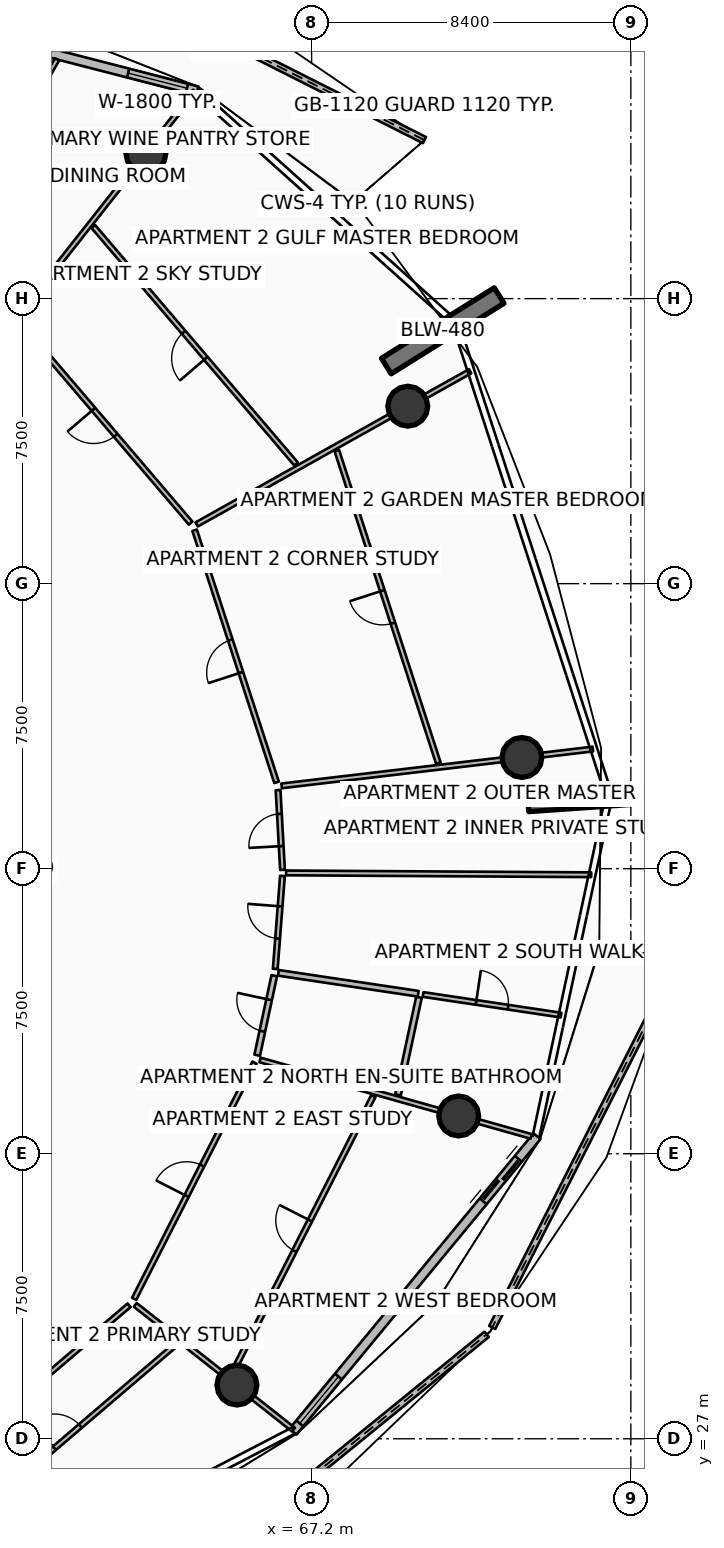
"""IFC4 building model, lengths in metres.
Left out: names, types, materials, properties, quantities, classifications, styles, units other than length and angle.
Written with IfcOpenShell. Run it as: python <this file> out.ifc"""

import sys

from ifc_helpers import new_model, si_unit, direction, frame, frame_2d, origin, origin_2d, place, context, subcontext, project, spatial, polyline, rectangle, circle, outline, extrude, element, fill, save


model = new_model("IFC4")
c1 = context("Model", 3, precision=1e-05, world=origin(), true_north=direction((0.0, 1.0)))
c2 = subcontext(c1, "Body", "Model", "MODEL_VIEW")
j1 = project(units=[si_unit("LENGTHUNIT", "METRE"), si_unit("PLANEANGLEUNIT", "RADIAN")], contexts=[c1])
p1 = place(None, origin())
s1 = spatial("IfcSite", under=j1, at=p1, CompositionType="ELEMENT")
p2 = place(p1, origin())
s2 = spatial("IfcBuilding", under=s1, at=p2, CompositionType="ELEMENT")
p3 = place(p2, frame((0.0, 0.0, 142.8)))
s3 = spatial("IfcBuildingStorey", under=s2, at=p3, CompositionType="ELEMENT", Elevation=142.8)
for number, where, z_axis, x_axis in (
    (1, (69.165, 55.226, 0.0), (0.0, 0.0, 1.0), (0.848, 0.53, 0.0)),
    (2, (72.897, 43.741, 0.0), (0.0, 0.0, 1.0), (0.998, 0.07, 0.0)),
):
    element("IfcWall", number, at=place(p3, frame(where, z_axis=z_axis, x_axis=x_axis)), inside=s3, PredefinedType="SOLIDWALL", context=c2, shape_type="SweptSolid", body=[
        extrude(rectangle(XDim=3.5, YDim=0.48, at=frame_2d((1.75, 0.0))), origin(), (0.0, 0.0, 1.0), 3.75),
    ])
for number, where, z_axis, x_axis in (
    (3, (69.73, 54.169, 0.0), (0.0, 0.0, 1.0), (1.0, 0.0, 0.0)),
    (4, (62.84, 60.824, 0.0), (0.0, 0.0, 1.0), (1.0, 0.0, 0.0)),
    (5, (65.234, 28.414, 0.0), (0.0, 0.0, 1.0), (1.0, 0.0, 0.0)),
    (6, (71.07, 35.494, 0.0), (0.0, 0.0, 1.0), (1.0, 0.0, 0.0)),
    (7, (72.733, 44.927, 0.0), (0.0, 0.0, 1.0), (1.0, 0.0, 0.0)),
):
    element("IfcColumn", number, at=place(p3, frame(where, z_axis=z_axis, x_axis=x_axis)), inside=s3, PredefinedType="COLUMN", context=c2, shape_type="SweptSolid", body=[
        extrude(circle(Radius=0.525, at=origin_2d()), origin(), (0.0, 0.0, 1.0), 3.5),
    ])
p4 = place(p3, frame((70.17, 61.17, 0.0), z_axis=(0.0, 0.0, 1.0), x_axis=(-0.892736735019, 0.450578652344, 0.0)))
e8 = element("IfcWall", 8, at=p4, inside=s3, PredefinedType="PARAPET", context=c2, shape_type="SweptSolid", body=[
    extrude(outline(polyline([(0.0, 0.0), (10.93, 0.0), (10.93, 1.348), (5.465, 1.562), (0.0, 1.747), (0.0, 0.0)])), frame((0.0, 0.09, 0.0), z_axis=(0.0, -1.0, 0.0), x_axis=(1.0, 0.0, 0.0)), (0.0, 0.0, 1.0), 0.18),
])
p5 = place(p3, frame((64.049, 23.44, 0.0), z_axis=(0.0, 0.0, 1.0), x_axis=(0.77587192649, 0.630890445073, 0.0)))
e9 = element("IfcWall", 9, at=p5, inside=s3, PredefinedType="PARAPET", context=c2, shape_type="SweptSolid", body=[
    extrude(outline(polyline([(0.0, 0.0), (9.998, 0.0), (9.998, 1.148), (4.999, 1.127), (0.0, 1.224), (0.0, 0.0)])), frame((0.0, 0.09, 0.0), z_axis=(0.0, -1.0, 0.0), x_axis=(1.0, 0.0, 0.0)), (0.0, 0.0, 1.0), 0.18),
])
p6 = place(p3, frame((71.953, 29.93, 0.0), z_axis=(0.0, 0.0, 1.0), x_axis=(0.452409779831, 0.891810176615, 0.0)))
e10 = element("IfcWall", 10, at=p6, inside=s3, PredefinedType="PARAPET", context=c2, shape_type="SweptSolid", body=[
    extrude(outline(polyline([(0.0, 0.0), (10.791, 0.0), (10.791, 1.483), (5.395, 1.284), (0.0, 1.148), (0.0, 0.0)])), frame((0.0, 0.09, 0.0), z_axis=(0.0, -1.0, 0.0), x_axis=(1.0, 0.0, 0.0)), (0.0, 0.0, 1.0), 0.18),
])
p7 = place(p3, frame((64.192, 62.466, 0.0), z_axis=(0.0, 0.0, 1.0), x_axis=(-0.968379685126, 0.249481032214, 0.0)))
e11 = element("IfcWall", 11, at=p7, inside=s3, PredefinedType="SOLIDWALL", context=c2, shape_type="SweptSolid", body=[
    extrude(rectangle(XDim=10.082, YDim=0.24, at=frame_2d((5.041, 0.0))), origin(), (0.0, 0.0, 1.0), 2.45),
])
p8 = place(p7, frame((7.862, 0.0, 0.0)))
e12 = element("IfcOpeningElement", 12, at=p8, cuts=e11, PredefinedType="OPENING", context=c2, shape_type="SweptSolid", body=[
    extrude(rectangle(XDim=1.45, YDim=2.15, at=frame_2d((0.725, 1.075))), frame((0.0, 0.13, 0.0), z_axis=(0.0, -1.0, 0.0), x_axis=(1.0, 0.0, 0.0)), (0.0, 0.0, 1.0), 0.26),
])
p9 = place(p7, frame((0.28, 0.0, 0.65)))
e13 = element("IfcOpeningElement", 13, at=p9, cuts=e11, PredefinedType="OPENING", context=c2, shape_type="SweptSolid", body=[
    extrude(rectangle(XDim=1.6, YDim=1.5, at=frame_2d((0.8, 0.75))), frame((0.0, 0.13, 0.0), z_axis=(0.0, -1.0, 0.0), x_axis=(1.0, 0.0, 0.0)), (0.0, 0.0, 1.0), 0.26),
])
p10 = place(p3, frame((66.709, 27.187, 0.0), z_axis=(0.0, 0.0, 1.0), x_axis=(0.636771922292, 0.77105221547, 0.0)))
e14 = element("IfcWall", 14, at=p10, inside=s3, PredefinedType="SOLIDWALL", context=c2, shape_type="SweptSolid", body=[
    extrude(rectangle(XDim=10.082, YDim=0.24, at=frame_2d((5.041, 0.0))), origin(), (0.0, 0.0, 1.0), 2.45),
])
p11 = place(p10, frame((7.862, 0.0, 0.0)))
e15 = element("IfcOpeningElement", 15, at=p11, cuts=e14, PredefinedType="OPENING", context=c2, shape_type="SweptSolid", body=[
    extrude(rectangle(XDim=1.45, YDim=2.15, at=frame_2d((0.725, 1.075))), frame((0.0, 0.13, 0.0), z_axis=(0.0, -1.0, 0.0), x_axis=(1.0, 0.0, 0.0)), (0.0, 0.0, 1.0), 0.26),
])
p12 = place(p10, frame((0.28, 0.0, 0.65)))
e16 = element("IfcOpeningElement", 16, at=p12, cuts=e14, PredefinedType="OPENING", context=c2, shape_type="SweptSolid", body=[
    extrude(rectangle(XDim=1.6, YDim=1.5, at=frame_2d((0.8, 0.75))), frame((0.0, 0.13, 0.0), z_axis=(0.0, -1.0, 0.0), x_axis=(1.0, 0.0, 0.0)), (0.0, 0.0, 1.0), 0.26),
])
p13 = place(p3, frame((57.093, 25.983, 0.0), z_axis=(0.0, 0.0, 1.0), x_axis=(0.76040680935, 0.649447060425, 0.0)))
e17 = element("IfcWall", 17, at=p13, inside=s3, PredefinedType="PARTITIONING", context=c2, shape_type="SweptSolid", body=[
    extrude(rectangle(XDim=6.975, YDim=0.125, at=frame_2d((3.487, 0.0))), origin(), (0.0, 0.0, 1.0), 2.94),
])
p14 = place(p13, frame((3.037, 0.0, 0.0)))
e18 = element("IfcOpeningElement", 18, at=p14, cuts=e17, PredefinedType="OPENING", context=c2, shape_type="SweptSolid", body=[
    extrude(rectangle(XDim=0.9, YDim=2.08, at=frame_2d((0.45, 1.04))), frame((0.0, 0.073, 0.0), z_axis=(0.0, -1.0, 0.0), x_axis=(1.0, 0.0, 0.0)), (0.0, 0.0, 1.0), 0.145),
])
p15 = place(p3, frame((57.882, 24.574, 0.0), z_axis=(0.0, 0.0, 1.0), x_axis=(0.760417937401, 0.649434030891, 0.0)))
e19 = element("IfcWall", 19, at=p15, inside=s3, PredefinedType="PARTITIONING", context=c2, shape_type="SweptSolid", body=[
    extrude(rectangle(XDim=7.605, YDim=0.125, at=frame_2d((3.802, 0.0))), origin(), (0.0, 0.0, 1.0), 2.94),
])
p16 = place(p15, frame((3.352, 0.0, 0.0)))
e20 = element("IfcOpeningElement", 20, at=p16, cuts=e19, PredefinedType="OPENING", context=c2, shape_type="SweptSolid", body=[
    extrude(rectangle(XDim=0.9, YDim=2.08, at=frame_2d((0.45, 1.04))), frame((0.0, 0.073, 0.0), z_axis=(0.0, -1.0, 0.0), x_axis=(1.0, 0.0, 0.0)), (0.0, 0.0, 1.0), 0.145),
])
p17 = place(p3, frame((62.559, 30.523, 0.0), z_axis=(0.0, 0.0, 1.0), x_axis=(0.785319981095, -0.619090080112, 0.0)))
e21 = element("IfcWall", 21, at=p17, inside=s3, PredefinedType="PARTITIONING", context=c2, shape_type="SweptSolid", body=[
    extrude(rectangle(XDim=5.301, YDim=0.125, at=frame_2d((2.65, 0.0))), origin(), (0.0, 0.0, 1.0), 2.94),
])
p18 = place(p3, frame((62.531, 30.683, 0.0), z_axis=(0.0, 0.0, 1.0), x_axis=(0.453977694262, 0.891013048789, 0.0)))
e22 = element("IfcWall", 22, at=p18, inside=s3, PredefinedType="PARTITIONING", context=c2, shape_type="SweptSolid", body=[
    extrude(rectangle(XDim=6.974, YDim=0.125, at=frame_2d((3.487, 0.0))), origin(), (0.0, 0.0, 1.0), 2.94),
])
p19 = place(p18, frame((3.037, 0.0, 0.0)))
e23 = element("IfcOpeningElement", 23, at=p19, cuts=e22, PredefinedType="OPENING", context=c2, shape_type="SweptSolid", body=[
    extrude(rectangle(XDim=0.9, YDim=2.08, at=frame_2d((0.45, 1.04))), frame((0.0, 0.073, 0.0), z_axis=(0.0, -1.0, 0.0), x_axis=(1.0, 0.0, 0.0)), (0.0, 0.0, 1.0), 0.145),
])
p20 = place(p3, frame((65.082, 28.671, 0.0), z_axis=(0.0, 0.0, 1.0), x_axis=(0.454001657521, 0.891000838927, 0.0)))
e24 = element("IfcWall", 24, at=p20, inside=s3, PredefinedType="PARTITIONING", context=c2, shape_type="SweptSolid", body=[
    extrude(rectangle(XDim=8.242, YDim=0.125, at=frame_2d((4.121, 0.0))), origin(), (0.0, 0.0, 1.0), 2.94),
])
p21 = place(p20, frame((3.671, 0.0, 0.0)))
e25 = element("IfcOpeningElement", 25, at=p21, cuts=e24, PredefinedType="OPENING", context=c2, shape_type="SweptSolid", body=[
    extrude(rectangle(XDim=0.9, YDim=2.08, at=frame_2d((0.45, 1.04))), frame((0.0, 0.073, 0.0), z_axis=(0.0, -1.0, 0.0), x_axis=(1.0, 0.0, 0.0)), (0.0, 0.0, 1.0), 0.145),
])
p22 = place(p3, frame((65.843, 36.968, 0.0), z_axis=(0.0, 0.0, 1.0), x_axis=(0.962456736489, -0.271435131084, 0.0)))
e26 = element("IfcWall", 26, at=p22, inside=s3, PredefinedType="PARTITIONING", context=c2, shape_type="SweptSolid", body=[
    extrude(rectangle(XDim=7.412, YDim=0.125, at=frame_2d((3.706, 0.0))), origin(), (0.0, 0.0, 1.0), 2.94),
])
p23 = place(p3, frame((65.768, 37.093, 0.0), z_axis=(0.0, 0.0, 1.0), x_axis=(0.210136736931, 0.977672006243, 0.0)))
e27 = element("IfcWall", 27, at=p23, inside=s3, PredefinedType="PARTITIONING", context=c2, shape_type="SweptSolid", body=[
    extrude(rectangle(XDim=2.14, YDim=0.15, at=frame_2d((1.07, 0.0))), origin(), (0.0, 0.0, 1.0), 2.94),
])
p24 = place(p23, frame((0.645, 0.0, 0.0)))
e28 = element("IfcOpeningElement", 28, at=p24, cuts=e27, PredefinedType="OPENING", context=c2, shape_type="SweptSolid", body=[
    extrude(rectangle(XDim=0.85, YDim=2.06, at=frame_2d((0.425, 1.03))), frame((0.0, 0.085, 0.0), z_axis=(0.0, -1.0, 0.0), x_axis=(1.0, 0.0, 0.0)), (0.0, 0.0, 1.0), 0.17),
])
p25 = place(p3, frame((69.473, 36.048, 0.0), z_axis=(0.0, 0.0, 1.0), x_axis=(0.210074988051, 0.97768527625, 0.0)))
e29 = element("IfcWall", 29, at=p25, inside=s3, PredefinedType="PARTITIONING", context=c2, shape_type="SweptSolid", body=[
    extrude(rectangle(XDim=2.626, YDim=0.15, at=frame_2d((1.313, 0.0))), origin(), (0.0, 0.0, 1.0), 2.94),
])
p26 = place(p3, frame((66.325, 39.26, 0.0), z_axis=(0.0, 0.0, 1.0), x_axis=(0.988998843182, -0.147923250997, 0.0)))
e30 = element("IfcWall", 30, at=p26, inside=s3, PredefinedType="PARTITIONING", context=c2, shape_type="SweptSolid", body=[
    extrude(rectangle(XDim=3.72, YDim=0.15, at=frame_2d((1.86, 0.0))), origin(), (0.0, 0.0, 1.0), 2.94),
])
p27 = place(p3, frame((70.133, 38.69, 0.0), z_axis=(0.0, 0.0, 1.0), x_axis=(0.989002592366, -0.147898182183, 0.0)))
e31 = element("IfcWall", 31, at=p27, inside=s3, PredefinedType="PARTITIONING", context=c2, shape_type="SweptSolid", body=[
    extrude(rectangle(XDim=3.671, YDim=0.125, at=frame_2d((1.835, 0.0))), origin(), (0.0, 0.0, 1.0), 2.94),
])
p28 = place(p27, frame((1.411, 0.0, 0.0)))
e32 = element("IfcOpeningElement", 32, at=p28, cuts=e31, PredefinedType="OPENING", context=c2, shape_type="SweptSolid", body=[
    extrude(rectangle(XDim=0.85, YDim=2.06, at=frame_2d((0.425, 1.03))), frame((0.0, 0.073, 0.0), z_axis=(0.0, -1.0, 0.0), x_axis=(1.0, 0.0, 0.0)), (0.0, 0.0, 1.0), 0.145),
])
p29 = place(p3, frame((66.529, 41.889, 0.0), z_axis=(0.0, 0.0, 1.0), x_axis=(0.999982052634, -0.00599119444, 0.0)))
e33 = element("IfcWall", 33, at=p29, inside=s3, PredefinedType="PARTITIONING", context=c2, shape_type="SweptSolid", body=[
    extrude(rectangle(XDim=8.028, YDim=0.125, at=frame_2d((4.014, 0.0))), origin(), (0.0, 0.0, 1.0), 2.94),
])
p30 = place(p3, frame((66.243, 39.363, 0.0), z_axis=(0.0, 0.0, 1.0), x_axis=(0.077198584258, 0.99701573638, 0.0)))
e34 = element("IfcWall", 34, at=p30, inside=s3, PredefinedType="PARTITIONING", context=c2, shape_type="SweptSolid", body=[
    extrude(rectangle(XDim=2.454, YDim=0.125, at=frame_2d((1.227, 0.0))), origin(), (0.0, 0.0, 1.0), 2.94),
])
p31 = place(p30, frame((0.802, 0.0, 0.0)))
e35 = element("IfcOpeningElement", 35, at=p31, cuts=e34, PredefinedType="OPENING", context=c2, shape_type="SweptSolid", body=[
    extrude(rectangle(XDim=0.85, YDim=2.06, at=frame_2d((0.425, 1.03))), frame((0.0, 0.073, 0.0), z_axis=(0.0, -1.0, 0.0), x_axis=(1.0, 0.0, 0.0)), (0.0, 0.0, 1.0), 0.145),
])
p32 = place(p3, frame((66.434, 41.969, 0.0), z_axis=(0.0, 0.0, 1.0), x_axis=(-0.055766005986, 0.998443865511, 0.0)))
e36 = element("IfcWall", 36, at=p32, inside=s3, PredefinedType="PARTITIONING", context=c2, shape_type="SweptSolid", body=[
    extrude(rectangle(XDim=2.101, YDim=0.125, at=frame_2d((1.051, 0.0))), origin(), (0.0, 0.0, 1.0), 2.94),
])
p33 = place(p32, frame((0.626, 0.0, 0.0)))
e37 = element("IfcOpeningElement", 37, at=p33, cuts=e36, PredefinedType="OPENING", context=c2, shape_type="SweptSolid", body=[
    extrude(rectangle(XDim=0.85, YDim=2.06, at=frame_2d((0.425, 1.03))), frame((0.0, 0.073, 0.0), z_axis=(0.0, -1.0, 0.0), x_axis=(1.0, 0.0, 0.0)), (0.0, 0.0, 1.0), 0.145),
])
p34 = place(p3, frame((66.41, 44.179, 0.0), z_axis=(0.0, 0.0, 1.0), x_axis=(0.993070354128, 0.117521367213, 0.0)))
e38 = element("IfcWall", 38, at=p34, inside=s3, PredefinedType="PARTITIONING", context=c2, shape_type="SweptSolid", body=[
    extrude(rectangle(XDim=8.247, YDim=0.125, at=frame_2d((4.124, 0.0))), origin(), (0.0, 0.0, 1.0), 2.94),
])
p35 = place(p3, frame((66.277, 44.272, 0.0), z_axis=(0.0, 0.0, 1.0), x_axis=(-0.308993461661, 0.951064162215, 0.0)))
e39 = element("IfcWall", 39, at=p35, inside=s3, PredefinedType="PARTITIONING", context=c2, shape_type="SweptSolid", body=[
    extrude(rectangle(XDim=6.974, YDim=0.125, at=frame_2d((3.487, 0.0))), origin(), (0.0, 0.0, 1.0), 2.94),
])
p36 = place(p35, frame((3.037, 0.0, 0.0)))
e40 = element("IfcOpeningElement", 40, at=p36, cuts=e39, PredefinedType="OPENING", context=c2, shape_type="SweptSolid", body=[
    extrude(rectangle(XDim=0.9, YDim=2.08, at=frame_2d((0.45, 1.04))), frame((0.0, 0.073, 0.0), z_axis=(0.0, -1.0, 0.0), x_axis=(1.0, 0.0, 0.0)), (0.0, 0.0, 1.0), 0.145),
])
p37 = place(p3, frame((70.535, 44.776, 0.0), z_axis=(0.0, 0.0, 1.0), x_axis=(-0.309002443549, 0.951061244022, 0.0)))
e41 = element("IfcWall", 41, at=p37, inside=s3, PredefinedType="PARTITIONING", context=c2, shape_type="SweptSolid", body=[
    extrude(rectangle(XDim=8.647, YDim=0.125, at=frame_2d((4.324, 0.0))), origin(), (0.0, 0.0, 1.0), 2.94),
])
p38 = place(p37, frame((3.874, 0.0, 0.0)))
e42 = element("IfcOpeningElement", 42, at=p38, cuts=e41, PredefinedType="OPENING", context=c2, shape_type="SweptSolid", body=[
    extrude(rectangle(XDim=0.9, YDim=2.08, at=frame_2d((0.45, 1.04))), frame((0.0, 0.073, 0.0), z_axis=(0.0, -1.0, 0.0), x_axis=(1.0, 0.0, 0.0)), (0.0, 0.0, 1.0), 0.145),
])
p39 = place(p3, frame((64.175, 51.059, 0.0), z_axis=(0.0, 0.0, 1.0), x_axis=(0.872491881101, 0.488628608877, 0.0)))
e43 = element("IfcWall", 43, at=p39, inside=s3, PredefinedType="PARTITIONING", context=c2, shape_type="SweptSolid", body=[
    extrude(rectangle(XDim=8.247, YDim=0.125, at=frame_2d((4.124, 0.0))), origin(), (0.0, 0.0, 1.0), 2.94),
])
p40 = place(p3, frame((64.017, 51.093, 0.0), z_axis=(0.0, 0.0, 1.0), x_axis=(-0.649447060425, 0.76040680935, 0.0)))
e44 = element("IfcWall", 44, at=p40, inside=s3, PredefinedType="PARTITIONING", context=c2, shape_type="SweptSolid", body=[
    extrude(rectangle(XDim=6.975, YDim=0.125, at=frame_2d((3.487, 0.0))), origin(), (0.0, 0.0, 1.0), 2.94),
])
p41 = place(p40, frame((3.037, 0.0, 0.0)))
e45 = element("IfcOpeningElement", 45, at=p41, cuts=e44, PredefinedType="OPENING", context=c2, shape_type="SweptSolid", body=[
    extrude(rectangle(XDim=0.9, YDim=2.08, at=frame_2d((0.45, 1.04))), frame((0.0, 0.073, 0.0), z_axis=(0.0, -1.0, 0.0), x_axis=(1.0, 0.0, 0.0)), (0.0, 0.0, 1.0), 0.145),
])
p42 = place(p3, frame((66.792, 52.648, 0.0), z_axis=(0.0, 0.0, 1.0), x_axis=(-0.649446834215, 0.76040700255, 0.0)))
e46 = element("IfcWall", 46, at=p42, inside=s3, PredefinedType="PARTITIONING", context=c2, shape_type="SweptSolid", body=[
    extrude(rectangle(XDim=8.216, YDim=0.125, at=frame_2d((4.108, 0.0))), origin(), (0.0, 0.0, 1.0), 2.94),
])
p43 = place(p42, frame((3.658, 0.0, 0.0)))
e47 = element("IfcOpeningElement", 47, at=p43, cuts=e46, PredefinedType="OPENING", context=c2, shape_type="SweptSolid", body=[
    extrude(rectangle(XDim=0.9, YDim=2.08, at=frame_2d((0.45, 1.04))), frame((0.0, 0.073, 0.0), z_axis=(0.0, -1.0, 0.0), x_axis=(1.0, 0.0, 0.0)), (0.0, 0.0, 1.0), 0.145),
])
p44 = place(p3, frame((59.477, 56.559, 0.0), z_axis=(0.0, 0.0, 1.0), x_axis=(0.619110986016, 0.785303499925, 0.0)))
e48 = element("IfcWall", 48, at=p44, inside=s3, PredefinedType="PARTITIONING", context=c2, shape_type="SweptSolid", body=[
    extrude(rectangle(XDim=7.513, YDim=0.125, at=frame_2d((3.756, 0.0))), origin(), (0.0, 0.0, 1.0), 2.94),
])
p45 = place(p3, frame((57.382, 57.978, 0.0), z_axis=(0.0, 0.0, 1.0), x_axis=(0.506339561396, 0.862334186128, 0.0)))
e49 = element("IfcWall", 49, at=p45, inside=s3, PredefinedType="PARTITIONING", context=c2, shape_type="SweptSolid", body=[
    extrude(rectangle(XDim=6.163, YDim=0.125, at=frame_2d((3.081, 0.0))), origin(), (0.0, 0.0, 1.0), 2.94),
])
p46 = place(p9, origin())
e50 = element("IfcWindow", 50, at=p46, inside=s3, PartitioningType="SINGLE_PANEL", PredefinedType="WINDOW", context=c2, shape_type="SweptSolid", body=[
    extrude(rectangle(XDim=1.6, YDim=1.5, at=frame_2d((0.8, 0.75))), frame((0.0, 0.03, 0.0), z_axis=(0.0, -1.0, 0.0), x_axis=(1.0, 0.0, 0.0)), (0.0, 0.0, 1.0), 0.06),
])
fill(e13, e50)
p47 = place(p11, origin())
e51 = element("IfcDoor", 51, at=p47, inside=s3, OperationType="DOUBLE_DOOR_SLIDING", PredefinedType="DOOR", context=c2, shape_type="SweptSolid", body=[
    extrude(rectangle(XDim=1.45, YDim=2.15, at=frame_2d((0.725, 1.075))), frame((0.0, 0.025, 0.0), z_axis=(0.0, -1.0, 0.0), x_axis=(1.0, 0.0, 0.0)), (0.0, 0.0, 1.0), 0.05),
])
fill(e15, e51)
p48 = place(p12, origin())
e52 = element("IfcWindow", 52, at=p48, inside=s3, PartitioningType="SINGLE_PANEL", PredefinedType="WINDOW", context=c2, shape_type="SweptSolid", body=[
    extrude(rectangle(XDim=1.6, YDim=1.5, at=frame_2d((0.8, 0.75))), frame((0.0, 0.03, 0.0), z_axis=(0.0, -1.0, 0.0), x_axis=(1.0, 0.0, 0.0)), (0.0, 0.0, 1.0), 0.06),
])
fill(e16, e52)
p49 = place(p16, origin())
e53 = element("IfcDoor", 53, at=p49, inside=s3, OperationType="SINGLE_SWING_LEFT", PredefinedType="DOOR", context=c2, shape_type="SweptSolid", body=[
    extrude(rectangle(XDim=0.9, YDim=2.08, at=frame_2d((0.45, 1.04))), frame((0.0, 0.025, 0.0), z_axis=(0.0, -1.0, 0.0), x_axis=(1.0, 0.0, 0.0)), (0.0, 0.0, 1.0), 0.05),
])
fill(e20, e53)
p50 = place(p19, origin())
e54 = element("IfcDoor", 54, at=p50, inside=s3, OperationType="SINGLE_SWING_LEFT", PredefinedType="DOOR", context=c2, shape_type="SweptSolid", body=[
    extrude(rectangle(XDim=0.9, YDim=2.08, at=frame_2d((0.45, 1.04))), frame((0.0, 0.025, 0.0), z_axis=(0.0, -1.0, 0.0), x_axis=(1.0, 0.0, 0.0)), (0.0, 0.0, 1.0), 0.05),
])
fill(e23, e54)
p51 = place(p21, origin())
e55 = element("IfcDoor", 55, at=p51, inside=s3, OperationType="SINGLE_SWING_RIGHT", PredefinedType="DOOR", context=c2, shape_type="SweptSolid", body=[
    extrude(rectangle(XDim=0.9, YDim=2.08, at=frame_2d((0.45, 1.04))), frame((0.0, 0.025, 0.0), z_axis=(0.0, -1.0, 0.0), x_axis=(1.0, 0.0, 0.0)), (0.0, 0.0, 1.0), 0.05),
])
fill(e25, e55)
p52 = place(p24, origin())
e56 = element("IfcDoor", 56, at=p52, inside=s3, OperationType="SINGLE_SWING_RIGHT", PredefinedType="DOOR", context=c2, shape_type="SweptSolid", body=[
    extrude(rectangle(XDim=0.85, YDim=2.06, at=frame_2d((0.425, 1.03))), frame((0.0, 0.025, 0.0), z_axis=(0.0, -1.0, 0.0), x_axis=(1.0, 0.0, 0.0)), (0.0, 0.0, 1.0), 0.05),
])
fill(e28, e56)
p53 = place(p28, origin())
e57 = element("IfcDoor", 57, at=p53, inside=s3, OperationType="SINGLE_SWING_LEFT", PredefinedType="DOOR", context=c2, shape_type="SweptSolid", body=[
    extrude(rectangle(XDim=0.85, YDim=2.06, at=frame_2d((0.425, 1.03))), frame((0.0, 0.025, 0.0), z_axis=(0.0, -1.0, 0.0), x_axis=(1.0, 0.0, 0.0)), (0.0, 0.0, 1.0), 0.05),
])
fill(e32, e57)
p54 = place(p31, origin())
e58 = element("IfcDoor", 58, at=p54, inside=s3, OperationType="SINGLE_SWING_RIGHT", PredefinedType="DOOR", context=c2, shape_type="SweptSolid", body=[
    extrude(rectangle(XDim=0.85, YDim=2.06, at=frame_2d((0.425, 1.03))), frame((0.0, 0.025, 0.0), z_axis=(0.0, -1.0, 0.0), x_axis=(1.0, 0.0, 0.0)), (0.0, 0.0, 1.0), 0.05),
])
fill(e35, e58)
p55 = place(p33, origin())
e59 = element("IfcDoor", 59, at=p55, inside=s3, OperationType="SINGLE_SWING_LEFT", PredefinedType="DOOR", context=c2, shape_type="SweptSolid", body=[
    extrude(rectangle(XDim=0.85, YDim=2.06, at=frame_2d((0.425, 1.03))), frame((0.0, 0.025, 0.0), z_axis=(0.0, -1.0, 0.0), x_axis=(1.0, 0.0, 0.0)), (0.0, 0.0, 1.0), 0.05),
])
fill(e37, e59)
p56 = place(p36, origin())
e60 = element("IfcDoor", 60, at=p56, inside=s3, OperationType="SINGLE_SWING_LEFT", PredefinedType="DOOR", context=c2, shape_type="SweptSolid", body=[
    extrude(rectangle(XDim=0.9, YDim=2.08, at=frame_2d((0.45, 1.04))), frame((0.0, 0.025, 0.0), z_axis=(0.0, -1.0, 0.0), x_axis=(1.0, 0.0, 0.0)), (0.0, 0.0, 1.0), 0.05),
])
fill(e40, e60)
p57 = place(p38, origin())
e61 = element("IfcDoor", 61, at=p57, inside=s3, OperationType="SINGLE_SWING_RIGHT", PredefinedType="DOOR", context=c2, shape_type="SweptSolid", body=[
    extrude(rectangle(XDim=0.9, YDim=2.08, at=frame_2d((0.45, 1.04))), frame((0.0, 0.025, 0.0), z_axis=(0.0, -1.0, 0.0), x_axis=(1.0, 0.0, 0.0)), (0.0, 0.0, 1.0), 0.05),
])
fill(e42, e61)
p58 = place(p41, origin())
e62 = element("IfcDoor", 62, at=p58, inside=s3, OperationType="SINGLE_SWING_RIGHT", PredefinedType="DOOR", context=c2, shape_type="SweptSolid", body=[
    extrude(rectangle(XDim=0.9, YDim=2.08, at=frame_2d((0.45, 1.04))), frame((0.0, 0.025, 0.0), z_axis=(0.0, -1.0, 0.0), x_axis=(1.0, 0.0, 0.0)), (0.0, 0.0, 1.0), 0.05),
])
fill(e45, e62)
p59 = place(p43, origin())
e63 = element("IfcDoor", 63, at=p59, inside=s3, OperationType="SINGLE_SWING_LEFT", PredefinedType="DOOR", context=c2, shape_type="SweptSolid", body=[
    extrude(rectangle(XDim=0.9, YDim=2.08, at=frame_2d((0.45, 1.04))), frame((0.0, 0.025, 0.0), z_axis=(0.0, -1.0, 0.0), x_axis=(1.0, 0.0, 0.0)), (0.0, 0.0, 1.0), 0.05),
])
fill(e47, e63)
save(model, sys.argv[1])
